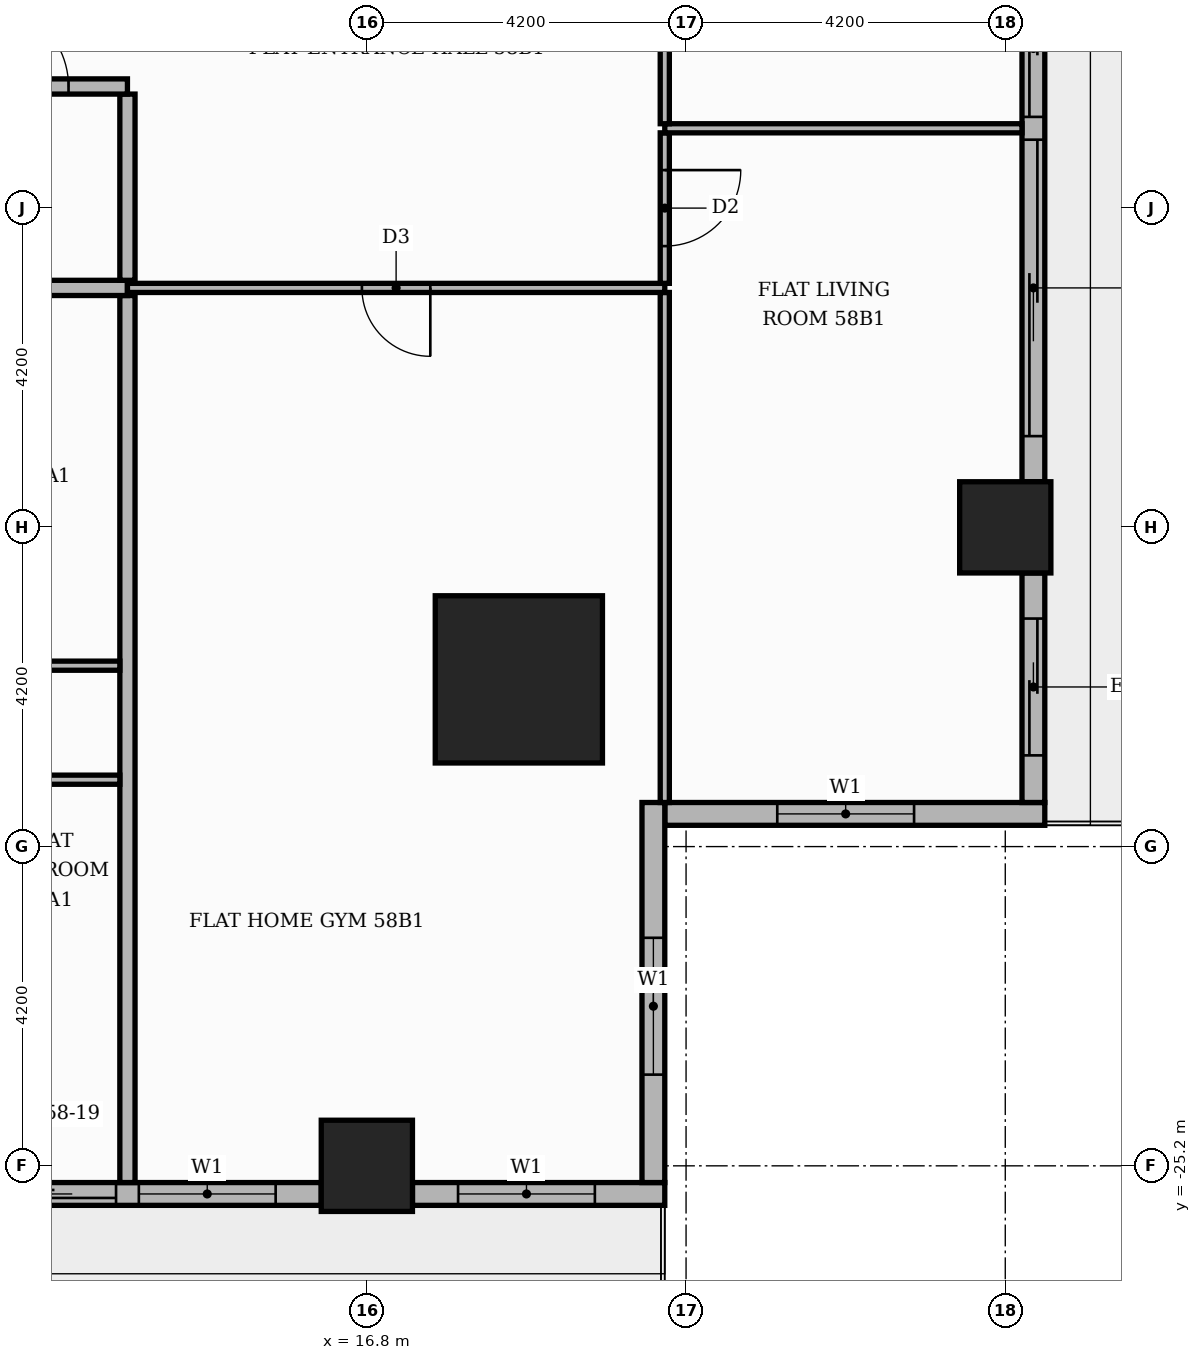
"""IFC4 building model, lengths in metres.
Left out: names, types, materials, properties, quantities, classifications, styles, units other than length and angle.
Written with IfcOpenShell. Run it as: python <this file> out.ifc"""

import sys

from ifc_helpers import new_model, si_unit, direction, frame, frame_2d, origin, origin_2d, place, context, subcontext, project, spatial, rectangle, extrude, element, fill, save


model = new_model("IFC4")
c1 = context("Model", 3, precision=1e-05, world=origin(), true_north=direction((0.0, 1.0)))
c2 = subcontext(c1, "Body", "Model", "MODEL_VIEW")
j1 = project(units=[si_unit("LENGTHUNIT", "METRE"), si_unit("PLANEANGLEUNIT", "RADIAN")], contexts=[c1])
p1 = place(None, origin())
s1 = spatial("IfcSite", under=j1, at=p1, CompositionType="ELEMENT")
p2 = place(p1, origin())
s2 = spatial("IfcBuilding", under=s1, at=p2, CompositionType="ELEMENT")
p3 = place(p2, frame((0.0, 0.0, 244.5)))
s3 = spatial("IfcBuildingStorey", under=s2, at=p3, CompositionType="ELEMENT", Elevation=244.5)
p4 = place(p3, frame((18.8, -18.8, 0.0), z_axis=(0.0, 0.0, 1.0), x_axis=(1.0, 0.0, 0.0)))
e1 = element("IfcColumn", 1, at=p4, inside=s3, PredefinedType="COLUMN", context=c2, shape_type="SweptSolid", body=[
    extrude(rectangle(XDim=2.2, YDim=2.2, at=origin_2d()), origin(), (0.0, 0.0, 1.0), 3.9),
])
for number, where, z_axis, x_axis in (
    (2, (25.2, -16.8, 0.0), (0.0, 0.0, 1.0), (1.0, 0.0, 0.0)),
    (3, (16.8, -25.2, 0.0), (0.0, 0.0, 1.0), (1.0, 0.0, 0.0)),
):
    element("IfcColumn", number, at=place(p3, frame(where, z_axis=z_axis, x_axis=x_axis)), inside=s3, PredefinedType="COLUMN", context=c2, shape_type="SweptSolid", body=[
        extrude(rectangle(XDim=1.2, YDim=1.2, at=origin_2d()), origin(), (0.0, 0.0, 1.0), 3.9),
    ])
p5 = place(p3, frame((20.72, -20.57, 0.0), z_axis=(0.0, 0.0, 1.0), x_axis=(1.0, 0.0, 0.0)))
e4 = element("IfcWall", 4, at=p5, inside=s3, PredefinedType="STANDARD", context=c2, shape_type="SweptSolid", body=[
    extrude(rectangle(XDim=5.0, YDim=0.3, at=frame_2d((2.5, 0.0))), origin(), (0.0, 0.0, 1.0), 3.48),
])
p6 = place(p5, frame((1.48, 0.0, 0.9)))
e5 = element("IfcOpeningElement", 5, at=p6, cuts=e4, PredefinedType="OPENING", context=c2, shape_type="SweptSolid", body=[
    extrude(rectangle(XDim=1.8, YDim=2.1, at=frame_2d((0.9, 1.05))), frame((0.0, 0.16, 0.0), z_axis=(0.0, -1.0, 0.0), x_axis=(1.0, 0.0, 0.0)), (0.0, 0.0, 1.0), 0.32),
])
p7 = place(p3, frame((25.57, -20.42, 0.0), z_axis=(0.0, 0.0, 1.0), x_axis=(0.0, 1.0, 0.0)))
e6 = element("IfcWall", 6, at=p7, inside=s3, PredefinedType="STANDARD", context=c2, shape_type="SweptSolid", body=[
    extrude(rectangle(XDim=3.02, YDim=0.3, at=frame_2d((1.51, 0.0))), origin(), (0.0, 0.0, 1.0), 3.48),
])
p8 = place(p7, frame((0.62, 0.0, 0.0)))
e7 = element("IfcOpeningElement", 7, at=p8, cuts=e6, PredefinedType="OPENING", context=c2, shape_type="SweptSolid", body=[
    extrude(rectangle(XDim=1.8, YDim=2.4, at=frame_2d((0.9, 1.2))), frame((0.0, 0.16, 0.0), z_axis=(0.0, -1.0, 0.0), x_axis=(1.0, 0.0, 0.0)), (0.0, 0.0, 1.0), 0.32),
])
p9 = place(p3, frame((25.57, -16.2, 0.0), z_axis=(0.0, 0.0, 1.0), x_axis=(0.0, 1.0, 0.0)))
e8 = element("IfcWall", 8, at=p9, inside=s3, PredefinedType="STANDARD", context=c2, shape_type="SweptSolid", body=[
    extrude(rectangle(XDim=7.2, YDim=0.3, at=frame_2d((3.6, 0.0))), origin(), (0.0, 0.0, 1.0), 3.48),
])
p10 = place(p9, frame((0.6, 0.0, 0.0)))
e9 = element("IfcOpeningElement", 9, at=p10, cuts=e8, PredefinedType="OPENING", context=c2, shape_type="SweptSolid", body=[
    extrude(rectangle(XDim=3.9, YDim=2.4, at=frame_2d((1.95, 1.2))), frame((0.0, 0.16, 0.0), z_axis=(0.0, -1.0, 0.0), x_axis=(1.0, 0.0, 0.0)), (0.0, 0.0, 1.0), 0.32),
])
p11 = place(p9, frame((4.8, 0.0, 0.0)))
e10 = element("IfcOpeningElement", 10, at=p11, cuts=e8, PredefinedType="OPENING", context=c2, shape_type="SweptSolid", body=[
    extrude(rectangle(XDim=1.8, YDim=2.4, at=frame_2d((0.9, 1.2))), frame((0.0, 0.16, 0.0), z_axis=(0.0, -1.0, 0.0), x_axis=(1.0, 0.0, 0.0)), (0.0, 0.0, 1.0), 0.32),
])
p12 = place(p3, frame((9.0, -25.57, 0.0), z_axis=(0.0, 0.0, 1.0), x_axis=(1.0, 0.0, 0.0)))
e11 = element("IfcWall", 11, at=p12, inside=s3, PredefinedType="STANDARD", context=c2, shape_type="SweptSolid", body=[
    extrude(rectangle(XDim=7.2, YDim=0.3, at=frame_2d((3.6, 0.0))), origin(), (0.0, 0.0, 1.0), 3.48),
])
p13 = place(p12, frame((0.6, 0.0, 0.9)))
e12 = element("IfcOpeningElement", 12, at=p13, cuts=e11, PredefinedType="OPENING", context=c2, shape_type="SweptSolid", body=[
    extrude(rectangle(XDim=1.8, YDim=2.1, at=frame_2d((0.9, 1.05))), frame((0.0, 0.16, 0.0), z_axis=(0.0, -1.0, 0.0), x_axis=(1.0, 0.0, 0.0)), (0.0, 0.0, 1.0), 0.32),
])
p14 = place(p12, frame((2.7, 0.0, 0.0)))
e13 = element("IfcOpeningElement", 13, at=p14, cuts=e11, PredefinedType="OPENING", context=c2, shape_type="SweptSolid", body=[
    extrude(rectangle(XDim=1.8, YDim=2.4, at=frame_2d((0.9, 1.2))), frame((0.0, 0.16, 0.0), z_axis=(0.0, -1.0, 0.0), x_axis=(1.0, 0.0, 0.0)), (0.0, 0.0, 1.0), 0.32),
])
p15 = place(p12, frame((4.8, 0.0, 0.9)))
e14 = element("IfcOpeningElement", 14, at=p15, cuts=e11, PredefinedType="OPENING", context=c2, shape_type="SweptSolid", body=[
    extrude(rectangle(XDim=1.8, YDim=2.1, at=frame_2d((0.9, 1.05))), frame((0.0, 0.16, 0.0), z_axis=(0.0, -1.0, 0.0), x_axis=(1.0, 0.0, 0.0)), (0.0, 0.0, 1.0), 0.32),
])
p16 = place(p3, frame((17.4, -25.57, 0.0), z_axis=(0.0, 0.0, 1.0), x_axis=(1.0, 0.0, 0.0)))
e15 = element("IfcWall", 15, at=p16, inside=s3, PredefinedType="STANDARD", context=c2, shape_type="SweptSolid", body=[
    extrude(rectangle(XDim=3.32, YDim=0.3, at=frame_2d((1.66, 0.0))), origin(), (0.0, 0.0, 1.0), 3.48),
])
p17 = place(p16, frame((0.6, 0.0, 0.9)))
e16 = element("IfcOpeningElement", 16, at=p17, cuts=e15, PredefinedType="OPENING", context=c2, shape_type="SweptSolid", body=[
    extrude(rectangle(XDim=1.8, YDim=2.1, at=frame_2d((0.9, 1.05))), frame((0.0, 0.16, 0.0), z_axis=(0.0, -1.0, 0.0), x_axis=(1.0, 0.0, 0.0)), (0.0, 0.0, 1.0), 0.32),
])
p18 = place(p3, frame((20.57, -25.42, 0.0), z_axis=(0.0, 0.0, 1.0), x_axis=(0.0, 1.0, 0.0)))
e17 = element("IfcWall", 17, at=p18, inside=s3, PredefinedType="STANDARD", context=c2, shape_type="SweptSolid", body=[
    extrude(rectangle(XDim=5.0, YDim=0.3, at=frame_2d((2.5, 0.0))), origin(), (0.0, 0.0, 1.0), 3.48),
])
p19 = place(p18, frame((1.42, 0.0, 0.9)))
e18 = element("IfcOpeningElement", 18, at=p19, cuts=e17, PredefinedType="OPENING", context=c2, shape_type="SweptSolid", body=[
    extrude(rectangle(XDim=1.8, YDim=2.1, at=frame_2d((0.9, 1.05))), frame((0.0, 0.16, 0.0), z_axis=(0.0, -1.0, 0.0), x_axis=(1.0, 0.0, 0.0)), (0.0, 0.0, 1.0), 0.32),
])
p20 = place(p3, frame((13.65, -25.42, 0.0), z_axis=(0.0, 0.0, 1.0), x_axis=(0.0, 1.0, 0.0)))
e19 = element("IfcWall", 19, at=p20, inside=s3, PredefinedType="PARTITIONING", context=c2, shape_type="SweptSolid", body=[
    extrude(rectangle(XDim=11.67, YDim=0.2, at=frame_2d((5.835, 0.0))), origin(), (0.0, 0.0, 1.0), 3.48),
])
p21 = place(p3, frame((20.72, -20.42, 0.0), z_axis=(0.0, 0.0, 1.0), x_axis=(0.0, 1.0, 0.0)))
e20 = element("IfcWall", 20, at=p21, inside=s3, PredefinedType="PARTITIONING", context=c2, shape_type="SweptSolid", body=[
    extrude(rectangle(XDim=6.71, YDim=0.12, at=frame_2d((3.355, 0.0))), origin(), (0.0, 0.0, 1.0), 3.48),
])
p22 = place(p3, frame((3.15, -20.12, 0.0), z_axis=(0.0, 0.0, 1.0), x_axis=(1.0, 0.0, 0.0)))
e21 = element("IfcWall", 21, at=p22, inside=s3, PredefinedType="PARTITIONING", context=c2, shape_type="SweptSolid", body=[
    extrude(rectangle(XDim=10.4, YDim=0.12, at=frame_2d((5.2, 0.0))), origin(), (0.0, 0.0, 1.0), 3.48),
])
p23 = place(p22, frame((1.65, 0.0, 0.0)))
e22 = element("IfcOpeningElement", 22, at=p23, cuts=e21, PredefinedType="OPENING", context=c2, shape_type="SweptSolid", body=[
    extrude(rectangle(XDim=0.9, YDim=2.1, at=frame_2d((0.45, 1.05))), frame((0.0, 0.07, 0.0), z_axis=(0.0, -1.0, 0.0), x_axis=(1.0, 0.0, 0.0)), (0.0, 0.0, 1.0), 0.14),
])
p24 = place(p22, frame((5.85, 0.0, 0.0)))
e23 = element("IfcOpeningElement", 23, at=p24, cuts=e21, PredefinedType="OPENING", context=c2, shape_type="SweptSolid", body=[
    extrude(rectangle(XDim=0.9, YDim=2.1, at=frame_2d((0.45, 1.05))), frame((0.0, 0.07, 0.0), z_axis=(0.0, -1.0, 0.0), x_axis=(1.0, 0.0, 0.0)), (0.0, 0.0, 1.0), 0.14),
])
p25 = place(p3, frame((-9.45, -18.62, 0.0), z_axis=(0.0, 0.0, 1.0), x_axis=(1.0, 0.0, 0.0)))
e24 = element("IfcWall", 24, at=p25, inside=s3, PredefinedType="PARTITIONING", context=c2, shape_type="SweptSolid", body=[
    extrude(rectangle(XDim=23.0, YDim=0.12, at=frame_2d((11.5, 0.0))), origin(), (0.0, 0.0, 1.0), 3.48),
])
p26 = place(p25, frame((2.7, 0.0, 0.0)))
e25 = element("IfcOpeningElement", 25, at=p26, cuts=e24, PredefinedType="OPENING", context=c2, shape_type="SweptSolid", body=[
    extrude(rectangle(XDim=0.9, YDim=2.1, at=frame_2d((0.45, 1.05))), frame((0.0, 0.07, 0.0), z_axis=(0.0, -1.0, 0.0), x_axis=(1.0, 0.0, 0.0)), (0.0, 0.0, 1.0), 0.14),
])
p27 = place(p25, frame((9.0, 0.0, 0.0)))
e26 = element("IfcOpeningElement", 26, at=p27, cuts=e24, PredefinedType="OPENING", context=c2, shape_type="SweptSolid", body=[
    extrude(rectangle(XDim=0.9, YDim=2.1, at=frame_2d((0.45, 1.05))), frame((0.0, 0.07, 0.0), z_axis=(0.0, -1.0, 0.0), x_axis=(1.0, 0.0, 0.0)), (0.0, 0.0, 1.0), 0.14),
])
p28 = place(p25, frame((13.2, 0.0, 0.0)))
e27 = element("IfcOpeningElement", 27, at=p28, cuts=e24, PredefinedType="OPENING", context=c2, shape_type="SweptSolid", body=[
    extrude(rectangle(XDim=0.9, YDim=2.1, at=frame_2d((0.45, 1.05))), frame((0.0, 0.07, 0.0), z_axis=(0.0, -1.0, 0.0), x_axis=(1.0, 0.0, 0.0)), (0.0, 0.0, 1.0), 0.14),
])
p29 = place(p25, frame((16.35, 0.0, 0.0)))
e28 = element("IfcOpeningElement", 28, at=p29, cuts=e24, PredefinedType="OPENING", context=c2, shape_type="SweptSolid", body=[
    extrude(rectangle(XDim=0.9, YDim=2.1, at=frame_2d((0.45, 1.05))), frame((0.0, 0.07, 0.0), z_axis=(0.0, -1.0, 0.0), x_axis=(1.0, 0.0, 0.0)), (0.0, 0.0, 1.0), 0.14),
])
p30 = place(p25, frame((20.55, 0.0, 0.0)))
e29 = element("IfcOpeningElement", 29, at=p30, cuts=e24, PredefinedType="OPENING", context=c2, shape_type="SweptSolid", body=[
    extrude(rectangle(XDim=0.9, YDim=2.1, at=frame_2d((0.45, 1.05))), frame((0.0, 0.07, 0.0), z_axis=(0.0, -1.0, 0.0), x_axis=(1.0, 0.0, 0.0)), (0.0, 0.0, 1.0), 0.14),
])
p31 = place(p3, frame((-25.42, -13.65, 0.0), z_axis=(0.0, 0.0, 1.0), x_axis=(1.0, 0.0, 0.0)))
e30 = element("IfcWall", 30, at=p31, inside=s3, PredefinedType="PARTITIONING", context=c2, shape_type="SweptSolid", body=[
    extrude(rectangle(XDim=39.07, YDim=0.2, at=frame_2d((19.535, 0.0))), origin(), (0.0, 0.0, 1.0), 3.48),
])
p32 = place(p31, frame((13.32, 0.0, 0.0)))
e31 = element("IfcOpeningElement", 31, at=p32, cuts=e30, PredefinedType="OPENING", context=c2, shape_type="SweptSolid", body=[
    extrude(rectangle(XDim=1.1, YDim=2.4, at=frame_2d((0.55, 1.2))), frame((0.0, 0.11, 0.0), z_axis=(0.0, -1.0, 0.0), x_axis=(1.0, 0.0, 0.0)), (0.0, 0.0, 1.0), 0.22),
])
p33 = place(p3, frame((13.65, -13.65, 0.0), z_axis=(0.0, 0.0, 1.0), x_axis=(1.0, 0.0, 0.0)))
e32 = element("IfcWall", 32, at=p33, inside=s3, PredefinedType="PARTITIONING", context=c2, shape_type="SweptSolid", body=[
    extrude(rectangle(XDim=7.07, YDim=0.12, at=frame_2d((3.535, 0.0))), origin(), (0.0, 0.0, 1.0), 3.48),
])
p34 = place(p33, frame((3.085, 0.0, 0.0)))
e33 = element("IfcOpeningElement", 33, at=p34, cuts=e32, PredefinedType="OPENING", context=c2, shape_type="SweptSolid", body=[
    extrude(rectangle(XDim=0.9, YDim=2.1, at=frame_2d((0.45, 1.05))), frame((0.0, 0.07, 0.0), z_axis=(0.0, -1.0, 0.0), x_axis=(1.0, 0.0, 0.0)), (0.0, 0.0, 1.0), 0.14),
])
p35 = place(p3, frame((20.72, -13.59, 0.0), z_axis=(0.0, 0.0, 1.0), x_axis=(0.0, 1.0, 0.0)))
e34 = element("IfcWall", 34, at=p35, inside=s3, PredefinedType="PARTITIONING", context=c2, shape_type="SweptSolid", body=[
    extrude(rectangle(XDim=1.98, YDim=0.12, at=frame_2d((0.99, 0.0))), origin(), (0.0, 0.0, 1.0), 3.48),
])
p36 = place(p35, frame((0.49, 0.0, 0.0)))
e35 = element("IfcOpeningElement", 35, at=p36, cuts=e34, PredefinedType="OPENING", context=c2, shape_type="SweptSolid", body=[
    extrude(rectangle(XDim=1.0, YDim=2.1, at=frame_2d((0.5, 1.05))), frame((0.0, 0.07, 0.0), z_axis=(0.0, -1.0, 0.0), x_axis=(1.0, 0.0, 0.0)), (0.0, 0.0, 1.0), 0.14),
])
p37 = place(p3, frame((13.65, -13.55, 0.0), z_axis=(0.0, 0.0, 1.0), x_axis=(0.0, 1.0, 0.0)))
e36 = element("IfcWall", 36, at=p37, inside=s3, PredefinedType="PARTITIONING", context=c2, shape_type="SweptSolid", body=[
    extrude(rectangle(XDim=2.45, YDim=0.2, at=frame_2d((1.225, 0.0))), origin(), (0.0, 0.0, 1.0), 3.48),
])
p38 = place(p3, frame((20.72, -11.55, 0.0), z_axis=(0.0, 0.0, 1.0), x_axis=(1.0, 0.0, 0.0)))
e37 = element("IfcWall", 37, at=p38, inside=s3, PredefinedType="PARTITIONING", context=c2, shape_type="SweptSolid", body=[
    extrude(rectangle(XDim=4.7, YDim=0.12, at=frame_2d((2.35, 0.0))), origin(), (0.0, 0.0, 1.0), 3.48),
])
p39 = place(p3, frame((20.72, -11.49, 0.0), z_axis=(0.0, 0.0, 1.0), x_axis=(0.0, 1.0, 0.0)))
e38 = element("IfcWall", 38, at=p39, inside=s3, PredefinedType="PARTITIONING", context=c2, shape_type="SweptSolid", body=[
    extrude(rectangle(XDim=6.18, YDim=0.12, at=frame_2d((3.09, 0.0))), origin(), (0.0, 0.0, 1.0), 3.48),
])
p40 = place(p39, frame((2.59, 0.0, 0.0)))
e39 = element("IfcOpeningElement", 39, at=p40, cuts=e38, PredefinedType="OPENING", context=c2, shape_type="SweptSolid", body=[
    extrude(rectangle(XDim=1.0, YDim=2.1, at=frame_2d((0.5, 1.05))), frame((0.0, 0.07, 0.0), z_axis=(0.0, -1.0, 0.0), x_axis=(1.0, 0.0, 0.0)), (0.0, 0.0, 1.0), 0.14),
])
p41 = place(p3, frame((11.0, -11.0, 0.0), z_axis=(0.0, 0.0, 1.0), x_axis=(1.0, 0.0, 0.0)))
e40 = element("IfcWall", 40, at=p41, inside=s3, PredefinedType="PARTITIONING", context=c2, shape_type="SweptSolid", body=[
    extrude(rectangle(XDim=2.65, YDim=0.2, at=frame_2d((1.325, 0.0))), origin(), (0.0, 0.0, 1.0), 3.48),
])
p42 = place(p41, frame((0.775, 0.0, 0.0)))
e41 = element("IfcOpeningElement", 41, at=p42, cuts=e40, PredefinedType="OPENING", context=c2, shape_type="SweptSolid", body=[
    extrude(rectangle(XDim=1.1, YDim=2.4, at=frame_2d((0.55, 1.2))), frame((0.0, 0.11, 0.0), z_axis=(0.0, -1.0, 0.0), x_axis=(1.0, 0.0, 0.0)), (0.0, 0.0, 1.0), 0.22),
])
p43 = place(p6, origin())
e42 = element("IfcWindow", 42, at=p43, inside=s3, PartitioningType="SINGLE_PANEL", PredefinedType="WINDOW", context=c2, shape_type="SweptSolid", body=[
    extrude(rectangle(XDim=1.8, YDim=2.1, at=frame_2d((0.9, 1.05))), frame((0.0, 0.03, 0.0), z_axis=(0.0, -1.0, 0.0), x_axis=(1.0, 0.0, 0.0)), (0.0, 0.0, 1.0), 0.06),
])
fill(e5, e42)
p44 = place(p8, origin())
e43 = element("IfcDoor", 43, at=p44, inside=s3, OperationType="SLIDING_TO_RIGHT", PredefinedType="DOOR", context=c2, shape_type="SweptSolid", body=[
    extrude(rectangle(XDim=1.8, YDim=2.4, at=frame_2d((0.9, 1.2))), frame((0.0, 0.025, 0.0), z_axis=(0.0, -1.0, 0.0), x_axis=(1.0, 0.0, 0.0)), (0.0, 0.0, 1.0), 0.05),
])
fill(e7, e43)
p45 = place(p10, origin())
e44 = element("IfcDoor", 44, at=p45, inside=s3, OperationType="SLIDING_TO_LEFT", PredefinedType="DOOR", context=c2, shape_type="SweptSolid", body=[
    extrude(rectangle(XDim=3.9, YDim=2.4, at=frame_2d((1.95, 1.2))), frame((0.0, 0.025, 0.0), z_axis=(0.0, -1.0, 0.0), x_axis=(1.0, 0.0, 0.0)), (0.0, 0.0, 1.0), 0.05),
])
fill(e9, e44)
p46 = place(p11, origin())
e45 = element("IfcDoor", 45, at=p46, inside=s3, OperationType="SLIDING_TO_RIGHT", PredefinedType="DOOR", context=c2, shape_type="SweptSolid", body=[
    extrude(rectangle(XDim=1.8, YDim=2.4, at=frame_2d((0.9, 1.2))), frame((0.0, 0.025, 0.0), z_axis=(0.0, -1.0, 0.0), x_axis=(1.0, 0.0, 0.0)), (0.0, 0.0, 1.0), 0.05),
])
fill(e10, e45)
p47 = place(p14, origin())
e46 = element("IfcDoor", 46, at=p47, inside=s3, OperationType="SLIDING_TO_RIGHT", PredefinedType="DOOR", context=c2, shape_type="SweptSolid", body=[
    extrude(rectangle(XDim=1.8, YDim=2.4, at=frame_2d((0.9, 1.2))), frame((0.0, 0.025, 0.0), z_axis=(0.0, -1.0, 0.0), x_axis=(1.0, 0.0, 0.0)), (0.0, 0.0, 1.0), 0.05),
])
fill(e13, e46)
p48 = place(p15, origin())
e47 = element("IfcWindow", 47, at=p48, inside=s3, PartitioningType="SINGLE_PANEL", PredefinedType="WINDOW", context=c2, shape_type="SweptSolid", body=[
    extrude(rectangle(XDim=1.8, YDim=2.1, at=frame_2d((0.9, 1.05))), frame((0.0, 0.03, 0.0), z_axis=(0.0, -1.0, 0.0), x_axis=(1.0, 0.0, 0.0)), (0.0, 0.0, 1.0), 0.06),
])
fill(e14, e47)
p49 = place(p17, origin())
e48 = element("IfcWindow", 48, at=p49, inside=s3, PartitioningType="SINGLE_PANEL", PredefinedType="WINDOW", context=c2, shape_type="SweptSolid", body=[
    extrude(rectangle(XDim=1.8, YDim=2.1, at=frame_2d((0.9, 1.05))), frame((0.0, 0.03, 0.0), z_axis=(0.0, -1.0, 0.0), x_axis=(1.0, 0.0, 0.0)), (0.0, 0.0, 1.0), 0.06),
])
fill(e16, e48)
p50 = place(p19, origin())
e49 = element("IfcWindow", 49, at=p50, inside=s3, PartitioningType="SINGLE_PANEL", PredefinedType="WINDOW", context=c2, shape_type="SweptSolid", body=[
    extrude(rectangle(XDim=1.8, YDim=2.1, at=frame_2d((0.9, 1.05))), frame((0.0, 0.03, 0.0), z_axis=(0.0, -1.0, 0.0), x_axis=(1.0, 0.0, 0.0)), (0.0, 0.0, 1.0), 0.06),
])
fill(e18, e49)
p51 = place(p42, origin())
e50 = element("IfcDoor", 50, at=p51, inside=s3, OperationType="SINGLE_SWING_LEFT", PredefinedType="DOOR", context=c2, shape_type="SweptSolid", body=[
    extrude(rectangle(XDim=1.1, YDim=2.4, at=frame_2d((0.55, 1.2))), frame((0.0, 0.025, 0.0), z_axis=(0.0, -1.0, 0.0), x_axis=(1.0, 0.0, 0.0)), (0.0, 0.0, 1.0), 0.05),
])
fill(e41, e50)
p52 = place(p34, frame((0.9, 0.0, 0.0), z_axis=(0.0, 0.0, 1.0), x_axis=(-1.0, 0.0, 0.0)))
e51 = element("IfcDoor", 51, at=p52, inside=s3, OperationType="SINGLE_SWING_RIGHT", PredefinedType="DOOR", context=c2, shape_type="SweptSolid", body=[
    extrude(rectangle(XDim=0.9, YDim=2.1, at=frame_2d((0.45, 1.05))), frame((0.0, 0.025, 0.0), z_axis=(0.0, -1.0, 0.0), x_axis=(1.0, 0.0, 0.0)), (0.0, 0.0, 1.0), 0.05),
])
fill(e33, e51)
p53 = place(p36, frame((1.0, 0.0, 0.0), z_axis=(0.0, 0.0, 1.0), x_axis=(-1.0, 0.0, 0.0)))
e52 = element("IfcDoor", 52, at=p53, inside=s3, OperationType="SINGLE_SWING_RIGHT", PredefinedType="DOOR", context=c2, shape_type="SweptSolid", body=[
    extrude(rectangle(XDim=1.0, YDim=2.1, at=frame_2d((0.5, 1.05))), frame((0.0, 0.025, 0.0), z_axis=(0.0, -1.0, 0.0), x_axis=(1.0, 0.0, 0.0)), (0.0, 0.0, 1.0), 0.05),
])
fill(e35, e52)
save(model, sys.argv[1])
